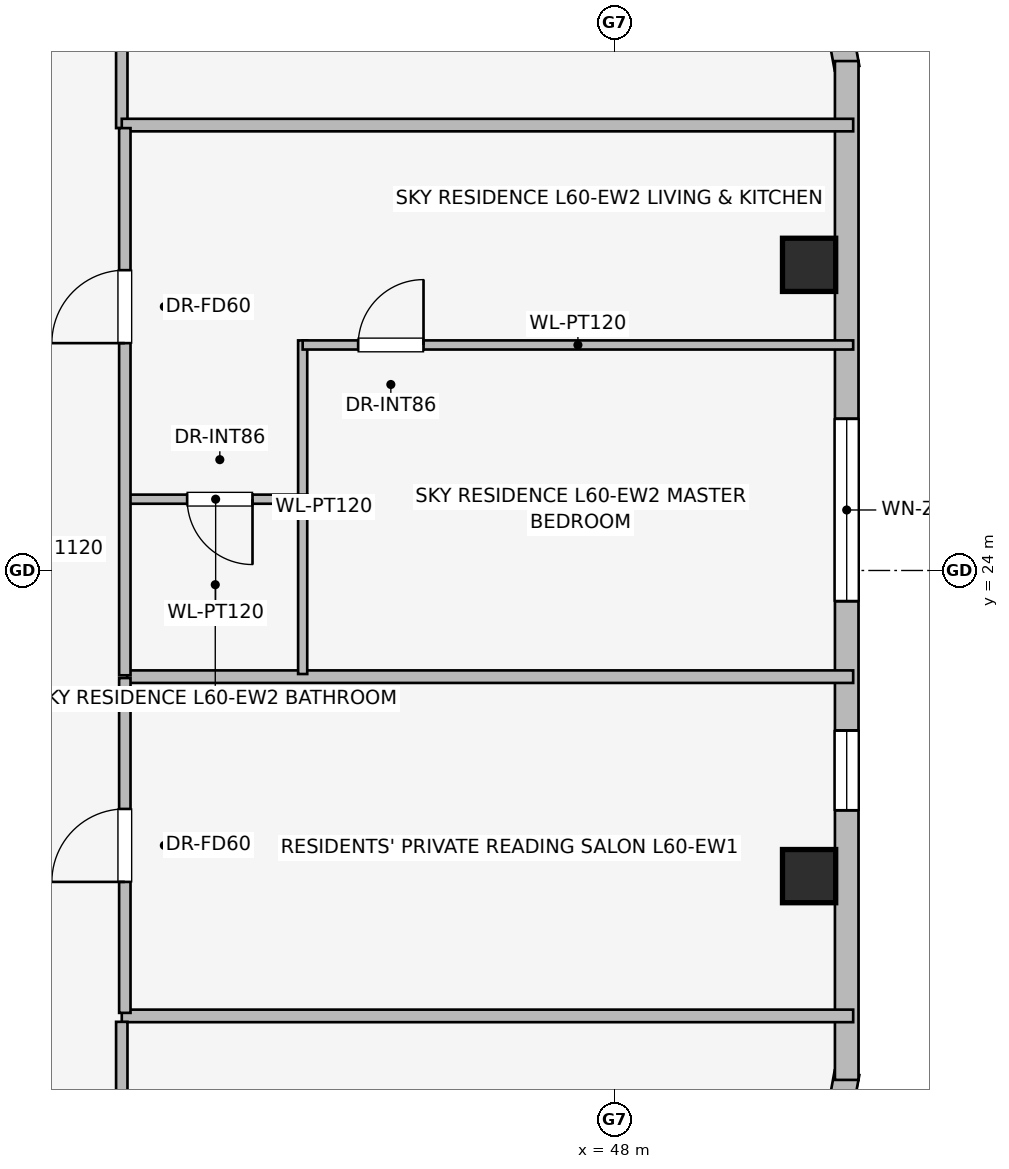
"""IFC4 building model, lengths in metres.
Left out: names, types, materials, properties, quantities, classifications, styles, units other than length and angle.
Written with IfcOpenShell. Run it as: python <this file> out.ifc"""

import sys

from ifc_helpers import new_model, si_unit, direction, frame, frame_2d, origin, origin_2d, place, context, subcontext, project, spatial, rectangle, extrude, element, fill, save


model = new_model("IFC4")
c1 = context("Model", 3, precision=1e-05, world=origin(), true_north=direction((0.0, 1.0)))
c2 = subcontext(c1, "Body", "Model", "MODEL_VIEW")
j1 = project(units=[si_unit("LENGTHUNIT", "METRE"), si_unit("PLANEANGLEUNIT", "RADIAN")], contexts=[c1])
p1 = place(None, origin())
s1 = spatial("IfcSite", under=j1, at=p1, CompositionType="ELEMENT")
p2 = place(p1, origin())
s2 = spatial("IfcBuilding", under=s1, at=p2, CompositionType="ELEMENT")
p3 = place(p2, frame((0.0, 0.0, 220.6)))
s3 = spatial("IfcBuildingStorey", under=s2, at=p3, CompositionType="ELEMENT", Elevation=220.6)
for number, where, z_axis, x_axis in (
    (1, (50.563, 19.979, 0.0), (0.0, 0.0, 1.0), (1.0, 0.0, 0.0)),
    (2, (50.563, 28.021, 0.0), (0.0, 0.0, 1.0), (1.0, 0.0, 0.0)),
):
    element("IfcColumn", number, at=place(p3, frame(where, z_axis=z_axis, x_axis=x_axis)), inside=s3, PredefinedType="COLUMN", context=c2, shape_type="SweptSolid", body=[
        extrude(rectangle(XDim=0.7, YDim=0.7, at=origin_2d()), origin(), (0.0, 0.0, 1.0), 3.55),
    ])
for number, where, z_axis, x_axis in (
    (3, (50.759, 32.257, 0.0), (0.0, 0.0, 1.0), (0.181, -0.984, 0.0)),
    (4, (51.062, 17.392, 0.0), (0.0, 0.0, 1.0), (-0.181, -0.984, 0.0)),
):
    element("IfcWall", number, at=place(p3, frame(where, z_axis=z_axis, x_axis=x_axis)), inside=s3, PredefinedType="STANDARD", context=c2, shape_type="SweptSolid", body=[
        extrude(rectangle(XDim=1.677, YDim=0.33, at=frame_2d((0.838, 0.0))), origin(), (0.0, 0.0, 1.0), 3.29),
    ])
p4 = place(p3, frame((51.058, 30.702, 0.0), z_axis=(0.0, 0.0, 1.0), x_axis=(0.0, -1.0, 0.0)))
e5 = element("IfcWall", 5, at=p4, inside=s3, PredefinedType="STANDARD", context=c2, shape_type="SweptSolid", body=[
    extrude(rectangle(XDim=13.404, YDim=0.31, at=frame_2d((6.702, 0.0))), origin(), (0.0, 0.0, 1.0), 3.29),
])
p5 = place(p4, frame((4.706, 0.0, 0.75)))
e6 = element("IfcOpeningElement", 6, at=p5, cuts=e5, PredefinedType="OPENING", context=c2, shape_type="SweptSolid", body=[
    extrude(rectangle(XDim=2.4, YDim=1.6, at=frame_2d((1.2, 0.8))), frame((0.0, 0.165, 0.0), z_axis=(0.0, -1.0, 0.0), x_axis=(1.0, 0.0, 0.0)), (0.0, 0.0, 1.0), 0.33),
])
p6 = place(p4, frame((8.807, 0.0, 0.75)))
e7 = element("IfcOpeningElement", 7, at=p6, cuts=e5, PredefinedType="OPENING", context=c2, shape_type="SweptSolid", body=[
    extrude(rectangle(XDim=1.05, YDim=1.4, at=frame_2d((0.525, 0.7))), frame((0.0, 0.165, 0.0), z_axis=(0.0, -1.0, 0.0), x_axis=(1.0, 0.0, 0.0)), (0.0, 0.0, 1.0), 0.33),
])
p7 = place(p3, frame((41.52, 29.82, 0.0), z_axis=(0.0, 0.0, 1.0), x_axis=(0.0, 1.0, 0.0)))
e8 = element("IfcWall", 8, at=p7, inside=s3, PredefinedType="PARTITIONING", context=c2, shape_type="SweptSolid", body=[
    extrude(rectangle(XDim=1.72, YDim=0.15, at=frame_2d((0.86, 0.0))), origin(), (0.0, 0.0, 1.0), 3.29),
])
for number, where, z_axis, x_axis in (
    (9, (41.52, 18.14, 0.0), (0.0, 0.0, 1.0), (1.0, 0.0, 0.0)),
    (10, (41.52, 29.86, 0.0), (0.0, 0.0, 1.0), (1.0, 0.0, 0.0)),
):
    element("IfcWall", number, at=place(p3, frame(where, z_axis=z_axis, x_axis=x_axis)), inside=s3, PredefinedType="PARTITIONING", context=c2, shape_type="SweptSolid", body=[
        extrude(rectangle(XDim=9.623, YDim=0.165, at=frame_2d((4.812, 0.0))), origin(), (0.0, 0.0, 1.0), 3.29),
    ])
p8 = place(p3, frame((41.59, 22.603, 0.0), z_axis=(0.0, 0.0, 1.0), x_axis=(1.0, 0.0, 0.0)))
e11 = element("IfcWall", 11, at=p8, inside=s3, PredefinedType="PARTITIONING", context=c2, shape_type="SweptSolid", body=[
    extrude(rectangle(XDim=9.553, YDim=0.165, at=frame_2d((4.776, 0.0))), origin(), (0.0, 0.0, 1.0), 3.29),
])
p9 = place(p3, frame((41.56, 18.18, 0.0), z_axis=(0.0, 0.0, 1.0), x_axis=(0.0, 1.0, 0.0)))
e12 = element("IfcWall", 12, at=p9, inside=s3, PredefinedType="PARTITIONING", context=c2, shape_type="SweptSolid", body=[
    extrude(rectangle(XDim=4.405, YDim=0.15, at=frame_2d((2.203, 0.0))), origin(), (0.0, 0.0, 1.0), 3.29),
])
p10 = place(p9, frame((1.723, 0.0, 0.0)))
e13 = element("IfcOpeningElement", 13, at=p10, cuts=e12, PredefinedType="OPENING", context=c2, shape_type="SweptSolid", body=[
    extrude(rectangle(XDim=0.96, YDim=2.0, at=frame_2d((0.48, 1.0))), frame((0.0, 0.085, 0.0), z_axis=(0.0, -1.0, 0.0), x_axis=(1.0, 0.0, 0.0)), (0.0, 0.0, 1.0), 0.17),
])
p11 = place(p3, frame((43.9, 22.638, 0.0), z_axis=(0.0, 0.0, 1.0), x_axis=(0.0, 1.0, 0.0)))
e14 = element("IfcWall", 14, at=p11, inside=s3, PredefinedType="PARTITIONING", context=c2, shape_type="SweptSolid", body=[
    extrude(rectangle(XDim=4.389, YDim=0.12, at=frame_2d((2.195, 0.0))), origin(), (0.0, 0.0, 1.0), 3.29),
])
p12 = place(p3, frame((43.96, 24.938, 0.0), z_axis=(0.0, 0.0, 1.0), x_axis=(-1.0, 0.0, 0.0)))
e15 = element("IfcWall", 15, at=p12, inside=s3, PredefinedType="PARTITIONING", context=c2, shape_type="SweptSolid", body=[
    extrude(rectangle(XDim=2.41, YDim=0.12, at=frame_2d((1.205, 0.0))), origin(), (0.0, 0.0, 1.0), 3.29),
])
p13 = place(p12, frame((0.72, 0.0, 0.0)))
e16 = element("IfcOpeningElement", 16, at=p13, cuts=e15, PredefinedType="OPENING", context=c2, shape_type="SweptSolid", body=[
    extrude(rectangle(XDim=0.86, YDim=2.0, at=frame_2d((0.43, 1.0))), frame((0.0, 0.07, 0.0), z_axis=(0.0, -1.0, 0.0), x_axis=(1.0, 0.0, 0.0)), (0.0, 0.0, 1.0), 0.14),
])
p14 = place(p3, frame((43.9, 26.967, 0.0), z_axis=(0.0, 0.0, 1.0), x_axis=(1.0, 0.0, 0.0)))
e17 = element("IfcWall", 17, at=p14, inside=s3, PredefinedType="PARTITIONING", context=c2, shape_type="SweptSolid", body=[
    extrude(rectangle(XDim=7.243, YDim=0.12, at=frame_2d((3.622, 0.0))), origin(), (0.0, 0.0, 1.0), 3.29),
])
p15 = place(p14, frame((0.73, 0.0, 0.0)))
e18 = element("IfcOpeningElement", 18, at=p15, cuts=e17, PredefinedType="OPENING", context=c2, shape_type="SweptSolid", body=[
    extrude(rectangle(XDim=0.86, YDim=2.0, at=frame_2d((0.43, 1.0))), frame((0.0, 0.07, 0.0), z_axis=(0.0, -1.0, 0.0), x_axis=(1.0, 0.0, 0.0)), (0.0, 0.0, 1.0), 0.14),
])
p16 = place(p3, frame((41.56, 22.621, 0.0), z_axis=(0.0, 0.0, 1.0), x_axis=(0.0, 1.0, 0.0)))
e19 = element("IfcWall", 19, at=p16, inside=s3, PredefinedType="PARTITIONING", context=c2, shape_type="SweptSolid", body=[
    extrude(rectangle(XDim=7.199, YDim=0.15, at=frame_2d((3.6, 0.0))), origin(), (0.0, 0.0, 1.0), 3.29),
])
p17 = place(p16, frame((4.37, 0.0, 0.0)))
e20 = element("IfcOpeningElement", 20, at=p17, cuts=e19, PredefinedType="OPENING", context=c2, shape_type="SweptSolid", body=[
    extrude(rectangle(XDim=0.96, YDim=2.0, at=frame_2d((0.48, 1.0))), frame((0.0, 0.085, 0.0), z_axis=(0.0, -1.0, 0.0), x_axis=(1.0, 0.0, 0.0)), (0.0, 0.0, 1.0), 0.17),
])
p18 = place(p3, frame((41.52, 16.46, 0.0), z_axis=(0.0, 0.0, 1.0), x_axis=(0.0, 1.0, 0.0)))
e21 = element("IfcWall", 21, at=p18, inside=s3, PredefinedType="PARTITIONING", context=c2, shape_type="SweptSolid", body=[
    extrude(rectangle(XDim=1.602, YDim=0.15, at=frame_2d((0.801, 0.0))), origin(), (0.0, 0.0, 1.0), 3.29),
])
p19 = place(p5, origin())
e22 = element("IfcWindow", 22, at=p19, inside=s3, PartitioningType="SINGLE_PANEL", PredefinedType="WINDOW", context=c2, shape_type="SweptSolid", body=[
    extrude(rectangle(XDim=2.4, YDim=1.6, at=frame_2d((1.2, 0.8))), frame((0.0, 0.03, 0.0), z_axis=(0.0, -1.0, 0.0), x_axis=(1.0, 0.0, 0.0)), (0.0, 0.0, 1.0), 0.06),
])
fill(e6, e22)
p20 = place(p6, origin())
e23 = element("IfcWindow", 23, at=p20, inside=s3, PartitioningType="SINGLE_PANEL", PredefinedType="WINDOW", context=c2, shape_type="SweptSolid", body=[
    extrude(rectangle(XDim=1.05, YDim=1.4, at=frame_2d((0.525, 0.7))), frame((0.0, 0.03, 0.0), z_axis=(0.0, -1.0, 0.0), x_axis=(1.0, 0.0, 0.0)), (0.0, 0.0, 1.0), 0.06),
])
fill(e7, e23)
p21 = place(p10, origin())
e24 = element("IfcDoor", 24, at=p21, inside=s3, OperationType="SINGLE_SWING_LEFT", PredefinedType="DOOR", context=c2, shape_type="SweptSolid", body=[
    extrude(rectangle(XDim=0.96, YDim=2.0, at=frame_2d((0.48, 1.0))), frame((0.0, 0.025, 0.0), z_axis=(0.0, -1.0, 0.0), x_axis=(1.0, 0.0, 0.0)), (0.0, 0.0, 1.0), 0.05),
])
fill(e13, e24)
p22 = place(p13, origin())
e25 = element("IfcDoor", 25, at=p22, inside=s3, OperationType="SINGLE_SWING_LEFT", PredefinedType="DOOR", context=c2, shape_type="SweptSolid", body=[
    extrude(rectangle(XDim=0.86, YDim=2.0, at=frame_2d((0.43, 1.0))), frame((0.0, 0.025, 0.0), z_axis=(0.0, -1.0, 0.0), x_axis=(1.0, 0.0, 0.0)), (0.0, 0.0, 1.0), 0.05),
])
fill(e16, e25)
p23 = place(p15, origin())
e26 = element("IfcDoor", 26, at=p23, inside=s3, OperationType="SINGLE_SWING_RIGHT", PredefinedType="DOOR", context=c2, shape_type="SweptSolid", body=[
    extrude(rectangle(XDim=0.86, YDim=2.0, at=frame_2d((0.43, 1.0))), frame((0.0, 0.025, 0.0), z_axis=(0.0, -1.0, 0.0), x_axis=(1.0, 0.0, 0.0)), (0.0, 0.0, 1.0), 0.05),
])
fill(e18, e26)
p24 = place(p17, origin())
e27 = element("IfcDoor", 27, at=p24, inside=s3, OperationType="SINGLE_SWING_LEFT", PredefinedType="DOOR", context=c2, shape_type="SweptSolid", body=[
    extrude(rectangle(XDim=0.96, YDim=2.0, at=frame_2d((0.48, 1.0))), frame((0.0, 0.025, 0.0), z_axis=(0.0, -1.0, 0.0), x_axis=(1.0, 0.0, 0.0)), (0.0, 0.0, 1.0), 0.05),
])
fill(e20, e27)
save(model, sys.argv[1])
